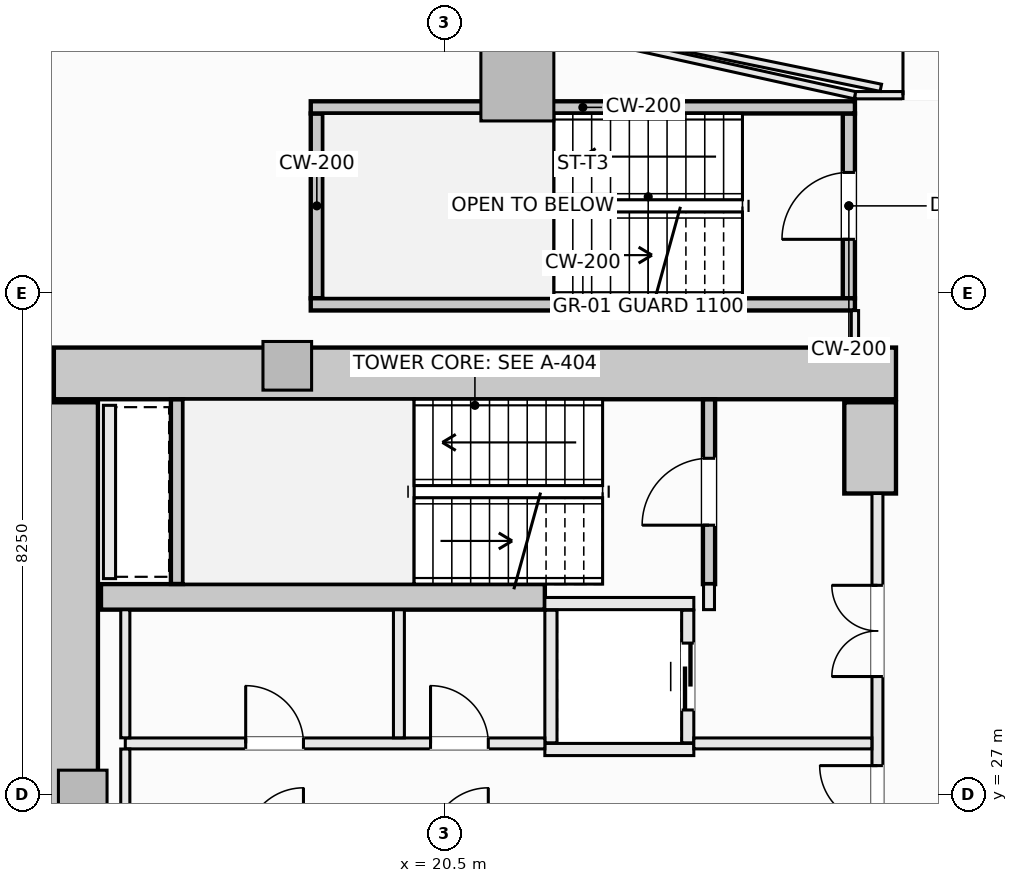
"""IFC4 building model, lengths in metres.
Left out: names, types, materials, properties, quantities, classifications, styles, units other than length and angle.
Written with IfcOpenShell. Run it as: python <this file> out.ifc"""

import sys

from ifc_helpers import new_model, si_unit, direction, frame, frame_2d, origin, origin_2d, place, context, subcontext, project, spatial, rectangle, extrude, element, fill, save


model = new_model("IFC4")
c1 = context("Model", 3, precision=1e-05, world=origin(), true_north=direction((0.0, 1.0)))
c2 = subcontext(c1, "Body", "Model", "MODEL_VIEW")
j1 = project(units=[si_unit("LENGTHUNIT", "METRE"), si_unit("PLANEANGLEUNIT", "RADIAN")], contexts=[c1])
p1 = place(None, origin())
s1 = spatial("IfcSite", under=j1, at=p1, CompositionType="ELEMENT")
p2 = place(p1, origin())
s2 = spatial("IfcBuilding", under=s1, at=p2, CompositionType="ELEMENT")
p3 = place(p2, frame((0.0, 0.0, 57.3)))
s3 = spatial("IfcBuildingStorey", under=s2, at=p3, CompositionType="ELEMENT", Elevation=57.3)
p4 = place(p3, frame((14.075, 33.925, -0.28), z_axis=(0.0, 0.0, 1.0), x_axis=(1.0, 0.0, 0.0)))
e1 = element("IfcWall", 1, at=p4, inside=s3, PredefinedType="SHEAR", context=c2, shape_type="SweptSolid", body=[
    extrude(rectangle(XDim=13.85, YDim=0.85, at=frame_2d((6.925, 0.0))), origin(), (0.0, 0.0, 1.0), 3.85),
])
p5 = place(p3, frame((14.375, 20.55, -0.28), z_axis=(0.0, 0.0, 1.0), x_axis=(0.0, 1.0, 0.0)))
e2 = element("IfcWall", 2, at=p5, inside=s3, PredefinedType="SHEAR", context=c2, shape_type="SweptSolid", body=[
    extrude(rectangle(XDim=12.9, YDim=0.85, at=frame_2d((6.45, 0.0))), origin(), (0.0, 0.0, 1.0), 3.85),
])
p6 = place(p3, frame((27.5, 31.95, -0.28), z_axis=(0.0, 0.0, 1.0), x_axis=(0.0, 1.0, 0.0)))
e3 = element("IfcWall", 3, at=p6, inside=s3, PredefinedType="SHEAR", context=c2, shape_type="SweptSolid", body=[
    extrude(rectangle(XDim=1.5, YDim=0.85, at=frame_2d((0.75, 0.0))), origin(), (0.0, 0.0, 1.0), 3.85),
])
p7 = place(p3, frame((14.85, 30.25, -0.28), z_axis=(0.0, 0.0, 1.0), x_axis=(1.0, 0.0, 0.0)))
e4 = element("IfcWall", 4, at=p7, inside=s3, PredefinedType="SHEAR", context=c2, shape_type="SweptSolid", body=[
    extrude(rectangle(XDim=7.3, YDim=0.42, at=frame_2d((3.65, 0.0))), origin(), (0.0, 0.0, 1.0), 3.85),
])
p8 = place(p3, frame((21.698, 38.677, -0.28), z_axis=(0.0, 0.0, 1.0), x_axis=(1.0, 0.0, 0.0)))
e5 = element("IfcColumn", 5, at=p8, inside=s3, PredefinedType="COLUMN", context=c2, shape_type="SweptSolid", body=[
    extrude(rectangle(XDim=1.2, YDim=1.2, at=origin_2d()), origin(), (0.0, 0.0, 1.0), 3.85),
])
for number, where, z_axis, x_axis in (
    (6, (17.914, 34.05, -0.28), (0.0, 0.0, 1.0), (1.0, 0.0, 0.0)),
    (7, (14.55, 27.0, -0.28), (0.0, 0.0, 1.0), (1.0, 0.0, 0.0)),
):
    element("IfcColumn", number, at=place(p3, frame(where, z_axis=z_axis, x_axis=x_axis)), inside=s3, PredefinedType="PILASTER", context=c2, shape_type="SweptSolid", body=[
        extrude(rectangle(XDim=0.8, YDim=0.8, at=origin_2d()), origin(), (0.0, 0.0, 1.0), 3.85),
    ])
p9 = place(p3, frame((24.85, 30.46, -0.28), z_axis=(0.0, 0.0, 1.0), x_axis=(0.0, 1.0, 0.0)))
e8 = element("IfcWall", 8, at=p9, inside=s3, PredefinedType="SHEAR", context=c2, shape_type="SweptSolid", body=[
    extrude(rectangle(XDim=3.038, YDim=0.2, at=frame_2d((1.519, 0.0))), origin(), (0.0, 0.0, 1.0), 3.85),
])
p10 = place(p9, frame((0.969, 0.0, 0.28)))
e9 = element("IfcOpeningElement", 9, at=p10, cuts=e8, PredefinedType="OPENING", context=c2, shape_type="SweptSolid", body=[
    extrude(rectangle(XDim=1.1, YDim=2.15, at=frame_2d((0.55, 1.075))), frame((0.0, 0.11, 0.0), z_axis=(0.0, -1.0, 0.0), x_axis=(1.0, 0.0, 0.0)), (0.0, 0.0, 1.0), 0.22),
])
p11 = place(p3, frame((16.1, 30.462, -0.28), z_axis=(0.0, 0.0, 1.0), x_axis=(0.0, 1.0, 0.0)))
e10 = element("IfcWall", 10, at=p11, inside=s3, PredefinedType="SHEAR", context=c2, shape_type="SweptSolid", body=[
    extrude(rectangle(XDim=3.036, YDim=0.2, at=frame_2d((1.518, 0.0))), origin(), (0.0, 0.0, 1.0), 3.85),
])
p12 = place(p3, frame((27.15, 35.16, -0.28), z_axis=(0.0, 0.0, 1.0), x_axis=(0.0, 1.0, 0.0)))
e11 = element("IfcWall", 11, at=p12, inside=s3, PredefinedType="SHEAR", context=c2, shape_type="SweptSolid", body=[
    extrude(rectangle(XDim=3.04, YDim=0.2, at=frame_2d((1.52, 0.0))), origin(), (0.0, 0.0, 1.0), 3.85),
])
p13 = place(p12, frame((0.97, 0.0, 0.28)))
e12 = element("IfcOpeningElement", 12, at=p13, cuts=e11, PredefinedType="OPENING", context=c2, shape_type="SweptSolid", body=[
    extrude(rectangle(XDim=1.1, YDim=2.15, at=frame_2d((0.55, 1.075))), frame((0.0, 0.11, 0.0), z_axis=(0.0, -1.0, 0.0), x_axis=(1.0, 0.0, 0.0)), (0.0, 0.0, 1.0), 0.22),
])
p14 = place(p3, frame((18.4, 35.16, -0.28), z_axis=(0.0, 0.0, 1.0), x_axis=(0.0, 1.0, 0.0)))
e13 = element("IfcWall", 13, at=p14, inside=s3, PredefinedType="SHEAR", context=c2, shape_type="SweptSolid", body=[
    extrude(rectangle(XDim=3.04, YDim=0.2, at=frame_2d((1.52, 0.0))), origin(), (0.0, 0.0, 1.0), 3.85),
])
for number, where, z_axis, x_axis in (
    (14, (18.3, 38.3, -0.28), (0.0, 0.0, 1.0), (1.0, 0.0, 0.0)),
    (15, (18.3, 35.06, -0.28), (0.0, 0.0, 1.0), (1.0, 0.0, 0.0)),
):
    element("IfcWall", number, at=place(p3, frame(where, z_axis=z_axis, x_axis=x_axis)), inside=s3, PredefinedType="SHEAR", context=c2, shape_type="SweptSolid", body=[
        extrude(rectangle(XDim=8.95, YDim=0.2, at=frame_2d((4.475, 0.0))), origin(), (0.0, 0.0, 1.0), 3.85),
    ])
for number, where, z_axis, x_axis in (
    (16, (22.15, 30.14, 0.0), (0.0, 0.0, 1.0), (1.0, 0.0, 0.0)),
    (17, (22.15, 27.74, 0.0), (0.0, 0.0, 1.0), (1.0, 0.0, 0.0)),
):
    element("IfcWall", number, at=place(p3, frame(where, z_axis=z_axis, x_axis=x_axis)), inside=s3, PredefinedType="SOLIDWALL", context=c2, shape_type="SweptSolid", body=[
        extrude(rectangle(XDim=2.45, YDim=0.2, at=frame_2d((1.225, 0.0))), origin(), (0.0, 0.0, 1.0), 3.57),
    ])
p15 = place(p3, frame((22.25, 27.85, 0.0), z_axis=(0.0, 0.0, 1.0), x_axis=(0.0, 1.0, 0.0)))
e18 = element("IfcWall", 18, at=p15, inside=s3, PredefinedType="SOLIDWALL", context=c2, shape_type="SweptSolid", body=[
    extrude(rectangle(XDim=2.18, YDim=0.2, at=frame_2d((1.09, 0.0))), origin(), (0.0, 0.0, 1.0), 3.57),
])
p16 = place(p3, frame((24.5, 27.85, 0.0), z_axis=(0.0, 0.0, 1.0), x_axis=(0.0, 1.0, 0.0)))
e19 = element("IfcWall", 19, at=p16, inside=s3, PredefinedType="SOLIDWALL", context=c2, shape_type="SweptSolid", body=[
    extrude(rectangle(XDim=2.18, YDim=0.2, at=frame_2d((1.09, 0.0))), origin(), (0.0, 0.0, 1.0), 3.57),
])
p17 = place(p16, frame((0.54, 0.0, 0.0)))
e20 = element("IfcOpeningElement", 20, at=p17, cuts=e19, PredefinedType="OPENING", context=c2, shape_type="SweptSolid", body=[
    extrude(rectangle(XDim=1.1, YDim=2.2, at=frame_2d((0.55, 1.1))), frame((0.0, 0.11, 0.0), z_axis=(0.0, -1.0, 0.0), x_axis=(1.0, 0.0, 0.0)), (0.0, 0.0, 1.0), 0.22),
])
p18 = place(p3, frame((14.99, 30.55, 0.0), z_axis=(0.0, 0.0, 1.0), x_axis=(0.0, 1.0, 0.0)))
e21 = element("IfcWall", 21, at=p18, inside=s3, PredefinedType="SOLIDWALL", context=c2, shape_type="SweptSolid", body=[
    extrude(rectangle(XDim=2.85, YDim=0.2, at=frame_2d((1.425, 0.0))), origin(), (0.0, 0.0, 1.0), 3.57),
])
p19 = place(p3, frame((24.85, 30.04, 0.0), z_axis=(0.0, 0.0, 1.0), x_axis=(0.0, 1.0, 0.0)))
e22 = element("IfcWall", 22, at=p19, inside=s3, PredefinedType="SOLIDWALL", context=c2, shape_type="SweptSolid", body=[
    extrude(rectangle(XDim=0.42, YDim=0.18, at=frame_2d((0.21, 0.0))), origin(), (0.0, 0.0, 1.0), 3.57),
])
p20 = place(p3, frame((27.62, 22.05, 0.0), z_axis=(0.0, 0.0, 1.0), x_axis=(0.0, 1.0, 0.0)))
e23 = element("IfcWall", 23, at=p20, inside=s3, PredefinedType="SOLIDWALL", context=c2, shape_type="SweptSolid", body=[
    extrude(rectangle(XDim=9.9, YDim=0.18, at=frame_2d((4.95, 0.0))), origin(), (0.0, 0.0, 1.0), 2.662),
])
p21 = place(p20, frame((4.475, 0.0, 0.0)))
e24 = element("IfcOpeningElement", 24, at=p21, cuts=e23, PredefinedType="OPENING", context=c2, shape_type="SweptSolid", body=[
    extrude(rectangle(XDim=0.95, YDim=2.1, at=frame_2d((0.475, 1.05))), frame((0.0, 0.1, 0.0), z_axis=(0.0, -1.0, 0.0), x_axis=(1.0, 0.0, 0.0)), (0.0, 0.0, 1.0), 0.2),
])
p22 = place(p20, frame((6.89, 0.0, 0.0)))
e25 = element("IfcOpeningElement", 25, at=p22, cuts=e23, PredefinedType="OPENING", context=c2, shape_type="SweptSolid", body=[
    extrude(rectangle(XDim=1.5, YDim=2.2, at=frame_2d((0.75, 1.1))), frame((0.0, 0.1, 0.0), z_axis=(0.0, -1.0, 0.0), x_axis=(1.0, 0.0, 0.0)), (0.0, 0.0, 1.0), 0.2),
])
p23 = place(p20, frame((1.51, 0.0, 0.0)))
e26 = element("IfcOpeningElement", 26, at=p23, cuts=e23, PredefinedType="OPENING", context=c2, shape_type="SweptSolid", body=[
    extrude(rectangle(XDim=1.5, YDim=2.2, at=frame_2d((0.75, 1.1))), frame((0.0, 0.1, 0.0), z_axis=(0.0, -1.0, 0.0), x_axis=(1.0, 0.0, 0.0)), (0.0, 0.0, 1.0), 0.2),
])
p24 = place(p3, frame((15.25, 27.84, 0.0), z_axis=(0.0, 0.0, 1.0), x_axis=(1.0, 0.0, 0.0)))
e27 = element("IfcWall", 27, at=p24, inside=s3, PredefinedType="SOLIDWALL", context=c2, shape_type="SweptSolid", body=[
    extrude(rectangle(XDim=6.9, YDim=0.18, at=frame_2d((3.45, 0.0))), origin(), (0.0, 0.0, 1.0), 3.57),
])
p25 = place(p24, frame((5.02, 0.0, 0.0)))
e28 = element("IfcOpeningElement", 28, at=p25, cuts=e27, PredefinedType="OPENING", context=c2, shape_type="SweptSolid", body=[
    extrude(rectangle(XDim=0.95, YDim=2.1, at=frame_2d((0.475, 1.05))), frame((0.0, 0.1, 0.0), z_axis=(0.0, -1.0, 0.0), x_axis=(1.0, 0.0, 0.0)), (0.0, 0.0, 1.0), 0.2),
])
p26 = place(p24, frame((1.98, 0.0, 0.0)))
e29 = element("IfcOpeningElement", 29, at=p26, cuts=e27, PredefinedType="OPENING", context=c2, shape_type="SweptSolid", body=[
    extrude(rectangle(XDim=0.95, YDim=2.1, at=frame_2d((0.475, 1.05))), frame((0.0, 0.1, 0.0), z_axis=(0.0, -1.0, 0.0), x_axis=(1.0, 0.0, 0.0)), (0.0, 0.0, 1.0), 0.2),
])
p27 = place(p3, frame((24.6, 27.84, 0.0), z_axis=(0.0, 0.0, 1.0), x_axis=(1.0, 0.0, 0.0)))
e30 = element("IfcWall", 30, at=p27, inside=s3, PredefinedType="SOLIDWALL", context=c2, shape_type="SweptSolid", body=[
    extrude(rectangle(XDim=2.928, YDim=0.18, at=frame_2d((1.464, 0.0))), origin(), (0.0, 0.0, 1.0), 3.57),
])
p28 = place(p3, frame((15.25, 26.252, 0.0), z_axis=(0.0, 0.0, 1.0), x_axis=(0.0, 1.0, 0.0)))
e31 = element("IfcWall", 31, at=p28, inside=s3, PredefinedType="PARTITIONING", context=c2, shape_type="SweptSolid", body=[
    extrude(rectangle(XDim=1.496, YDim=0.15, at=frame_2d((0.748, 0.0))), origin(), (0.0, 0.0, 1.0), 3.57),
])
p29 = place(p3, frame((15.25, 27.932, 0.0), z_axis=(0.0, 0.0, 1.0), x_axis=(0.0, 1.0, 0.0)))
e32 = element("IfcWall", 32, at=p29, inside=s3, PredefinedType="PARTITIONING", context=c2, shape_type="SweptSolid", body=[
    extrude(rectangle(XDim=2.106, YDim=0.15, at=frame_2d((1.053, 0.0))), origin(), (0.0, 0.0, 1.0), 3.57),
])
p30 = place(p3, frame((19.75, 27.932, 0.0), z_axis=(0.0, 0.0, 1.0), x_axis=(0.0, 1.0, 0.0)))
e33 = element("IfcWall", 33, at=p30, inside=s3, PredefinedType="SOLIDWALL", context=c2, shape_type="SweptSolid", body=[
    extrude(rectangle(XDim=2.106, YDim=0.18, at=frame_2d((1.053, 0.0))), origin(), (0.0, 0.0, 1.0), 3.57),
])
p31 = place(p3, frame((27.25, 34.352, 0.0), z_axis=(0.0, 0.0, 1.0), x_axis=(0.0, 1.0, 0.0)))
e34 = element("IfcWall", 34, at=p31, inside=s3, PredefinedType="PARTITIONING", context=c2, shape_type="SweptSolid", body=[
    extrude(rectangle(XDim=0.606, YDim=0.12, at=frame_2d((0.303, 0.0))), origin(), (0.0, 0.0, 1.0), 3.57),
])
p32 = place(p3, frame((27.25, 38.5, 0.0), z_axis=(0.0, 0.0, 1.0), x_axis=(1.0, 0.0, 0.0)))
e35 = element("IfcWall", 35, at=p32, inside=s3, PredefinedType="PARTITIONING", context=c2, shape_type="SweptSolid", body=[
    extrude(rectangle(XDim=2.53, YDim=0.12, at=frame_2d((1.265, 0.0))), origin(), (0.0, 0.0, 1.0), 3.57),
])
p33 = place(p32, frame((0.79, 0.0, 0.0)))
e36 = element("IfcOpeningElement", 36, at=p33, cuts=e35, PredefinedType="OPENING", context=c2, shape_type="SweptSolid", body=[
    extrude(rectangle(XDim=0.95, YDim=2.1, at=frame_2d((0.475, 1.05))), frame((0.0, 0.07, 0.0), z_axis=(0.0, -1.0, 0.0), x_axis=(1.0, 0.0, 0.0)), (0.0, 0.0, 1.0), 0.14),
])
p34 = place(p3, frame((14.05, 41.421, 0.0), z_axis=(0.0, 0.0, 1.0), x_axis=(0.979545345603, -0.201223547102, 0.0)))
e37 = element("IfcWall", 37, at=p34, inside=s3, PredefinedType="PARTITIONING", context=c2, shape_type="SweptSolid", body=[
    extrude(rectangle(XDim=13.91, YDim=0.12, at=frame_2d((6.955, 0.0))), origin(), (0.0, 0.0, 1.0), 2.934),
])
p35 = place(p3, frame((23.693, 39.287, 0.0), z_axis=(0.0, 0.0, 1.0), x_axis=(0.976382184517, -0.216050525936, 0.0)))
e38 = element("IfcWall", 38, at=p35, inside=s3, PredefinedType="PARTITIONING", context=c2, shape_type="SweptSolid", body=[
    extrude(rectangle(XDim=3.643, YDim=0.12, at=frame_2d((1.822, 0.0))), origin(), (0.0, 0.0, 1.0), 2.934),
])
p36 = place(p10, origin())
e39 = element("IfcDoor", 39, at=p36, inside=s3, OperationType="SINGLE_SWING_LEFT", PredefinedType="DOOR", context=c2, shape_type="SweptSolid", body=[
    extrude(rectangle(XDim=1.1, YDim=2.15, at=frame_2d((0.55, 1.075))), frame((0.0, 0.025, 0.0), z_axis=(0.0, -1.0, 0.0), x_axis=(1.0, 0.0, 0.0)), (0.0, 0.0, 1.0), 0.05),
])
fill(e9, e39)
p37 = place(p13, origin())
e40 = element("IfcDoor", 40, at=p37, inside=s3, OperationType="SINGLE_SWING_LEFT", PredefinedType="DOOR", context=c2, shape_type="SweptSolid", body=[
    extrude(rectangle(XDim=1.1, YDim=2.15, at=frame_2d((0.55, 1.075))), frame((0.0, 0.025, 0.0), z_axis=(0.0, -1.0, 0.0), x_axis=(1.0, 0.0, 0.0)), (0.0, 0.0, 1.0), 0.05),
])
fill(e12, e40)
p38 = place(p17, origin())
e41 = element("IfcDoor", 41, at=p38, inside=s3, OperationType="SLIDING_TO_LEFT", PredefinedType="DOOR", context=c2, shape_type="SweptSolid", body=[
    extrude(rectangle(XDim=1.1, YDim=2.2, at=frame_2d((0.55, 1.1))), frame((0.0, 0.025, 0.0), z_axis=(0.0, -1.0, 0.0), x_axis=(1.0, 0.0, 0.0)), (0.0, 0.0, 1.0), 0.05),
])
fill(e20, e41)
p39 = place(p21, origin())
e42 = element("IfcDoor", 42, at=p39, inside=s3, OperationType="SINGLE_SWING_RIGHT", PredefinedType="DOOR", context=c2, shape_type="SweptSolid", body=[
    extrude(rectangle(XDim=0.95, YDim=2.1, at=frame_2d((0.475, 1.05))), frame((0.0, 0.025, 0.0), z_axis=(0.0, -1.0, 0.0), x_axis=(1.0, 0.0, 0.0)), (0.0, 0.0, 1.0), 0.05),
])
fill(e24, e42)
p40 = place(p22, origin())
e43 = element("IfcDoor", 43, at=p40, inside=s3, OperationType="DOUBLE_DOOR_SINGLE_SWING", PredefinedType="DOOR", context=c2, shape_type="SweptSolid", body=[
    extrude(rectangle(XDim=1.5, YDim=2.2, at=frame_2d((0.75, 1.1))), frame((0.0, 0.025, 0.0), z_axis=(0.0, -1.0, 0.0), x_axis=(1.0, 0.0, 0.0)), (0.0, 0.0, 1.0), 0.05),
])
fill(e25, e43)
p41 = place(p25, origin())
e44 = element("IfcDoor", 44, at=p41, inside=s3, OperationType="SINGLE_SWING_LEFT", PredefinedType="DOOR", context=c2, shape_type="SweptSolid", body=[
    extrude(rectangle(XDim=0.95, YDim=2.1, at=frame_2d((0.475, 1.05))), frame((0.0, 0.025, 0.0), z_axis=(0.0, -1.0, 0.0), x_axis=(1.0, 0.0, 0.0)), (0.0, 0.0, 1.0), 0.05),
])
fill(e28, e44)
p42 = place(p26, origin())
e45 = element("IfcDoor", 45, at=p42, inside=s3, OperationType="SINGLE_SWING_LEFT", PredefinedType="DOOR", context=c2, shape_type="SweptSolid", body=[
    extrude(rectangle(XDim=0.95, YDim=2.1, at=frame_2d((0.475, 1.05))), frame((0.0, 0.025, 0.0), z_axis=(0.0, -1.0, 0.0), x_axis=(1.0, 0.0, 0.0)), (0.0, 0.0, 1.0), 0.05),
])
fill(e29, e45)
p43 = place(p33, origin())
e46 = element("IfcDoor", 46, at=p43, inside=s3, OperationType="SINGLE_SWING_LEFT", PredefinedType="DOOR", context=c2, shape_type="SweptSolid", body=[
    extrude(rectangle(XDim=0.95, YDim=2.1, at=frame_2d((0.475, 1.05))), frame((0.0, 0.025, 0.0), z_axis=(0.0, -1.0, 0.0), x_axis=(1.0, 0.0, 0.0)), (0.0, 0.0, 1.0), 0.05),
])
fill(e36, e46)
save(model, sys.argv[1])
